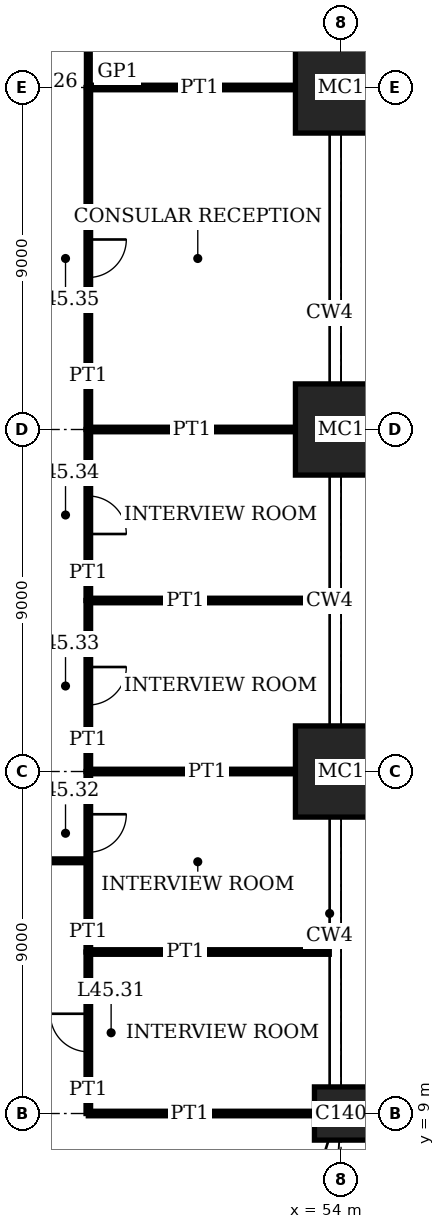
"""IFC4 building model, lengths in metres.
Left out: names, types, materials, properties, quantities, classifications, styles, units other than length and angle.
Written with IfcOpenShell. Run it as: python <this file> out.ifc"""

import sys

from ifc_helpers import new_model, si_unit, direction, frame, frame_2d, origin, origin_2d, place, context, subcontext, project, spatial, rectangle, extrude, element, fill, save


model = new_model("IFC4")
c1 = context("Model", 3, precision=1e-05, world=origin(), true_north=direction((0.0, 1.0)))
c2 = subcontext(c1, "Body", "Model", "MODEL_VIEW")
j1 = project(units=[si_unit("LENGTHUNIT", "METRE"), si_unit("PLANEANGLEUNIT", "RADIAN")], contexts=[c1])
p1 = place(None, origin())
s1 = spatial("IfcSite", under=j1, at=p1, CompositionType="ELEMENT")
p2 = place(p1, origin())
s2 = spatial("IfcBuilding", under=s1, at=p2, CompositionType="ELEMENT")
p3 = place(p2, frame((0.0, 0.0, 186.2)))
s3 = spatial("IfcBuildingStorey", under=s2, at=p3, CompositionType="ELEMENT", Elevation=186.2)
p4 = place(p3, frame((54.0, 9.0, 0.0), z_axis=(0.0, 0.0, 1.0), x_axis=(1.0, 0.0, 0.0)))
e1 = element("IfcColumn", 1, at=p4, inside=s3, PredefinedType="COLUMN", context=c2, shape_type="SweptSolid", body=[
    extrude(rectangle(XDim=1.4, YDim=1.4, at=origin_2d()), origin(), (0.0, 0.0, 1.0), 4.0),
])
for number, where, z_axis, x_axis in (
    (2, (54.0, 18.0, 0.0), (0.0, 0.0, 1.0), (1.0, 0.0, 0.0)),
    (3, (54.0, 27.0, 0.0), (0.0, 0.0, 1.0), (1.0, 0.0, 0.0)),
    (4, (54.0, 36.0, 0.0), (0.0, 0.0, 1.0), (1.0, 0.0, 0.0)),
):
    element("IfcColumn", number, at=place(p3, frame(where, z_axis=z_axis, x_axis=x_axis)), inside=s3, PredefinedType="COLUMN", context=c2, shape_type="SweptSolid", body=[
        extrude(rectangle(XDim=2.4, YDim=2.4, at=origin_2d()), origin(), (0.0, 0.0, 1.0), 4.0),
    ])
p5 = place(p3, frame((47.35, 9.0, 0.0), z_axis=(0.0, 0.0, 1.0), x_axis=(1.0, 0.0, 0.0)))
e5 = element("IfcWall", 5, at=p5, inside=s3, PredefinedType="PARTITIONING", context=c2, shape_type="SweptSolid", body=[
    extrude(rectangle(XDim=5.95, YDim=0.12, at=frame_2d((2.975, 0.0))), origin(), (0.0, 0.0, 1.0), 3.05),
])
p6 = place(p3, frame((47.35, 13.25, 0.0), z_axis=(0.0, 0.0, 1.0), x_axis=(1.0, 0.0, 0.0)))
e6 = element("IfcWall", 6, at=p6, inside=s3, PredefinedType="PARTITIONING", context=c2, shape_type="SweptSolid", body=[
    extrude(rectangle(XDim=6.34, YDim=0.12, at=frame_2d((3.17, 0.0))), origin(), (0.0, 0.0, 1.0), 3.1),
])
p7 = place(p3, frame((40.5, 15.65, 0.0), z_axis=(0.0, 0.0, 1.0), x_axis=(1.0, 0.0, 0.0)))
e7 = element("IfcWall", 7, at=p7, inside=s3, PredefinedType="PARTITIONING", context=c2, shape_type="SweptSolid", body=[
    extrude(rectangle(XDim=6.85, YDim=0.1, at=frame_2d((3.425, 0.0))), origin(), (0.0, 0.0, 1.0), 3.75),
])
p8 = place(p3, frame((47.35, 18.0, 0.0), z_axis=(0.0, 0.0, 1.0), x_axis=(1.0, 0.0, 0.0)))
e8 = element("IfcWall", 8, at=p8, inside=s3, PredefinedType="PARTITIONING", context=c2, shape_type="SweptSolid", body=[
    extrude(rectangle(XDim=5.45, YDim=0.12, at=frame_2d((2.725, 0.0))), origin(), (0.0, 0.0, 1.0), 3.05),
])
p9 = place(p3, frame((47.35, 22.5, 0.0), z_axis=(0.0, 0.0, 1.0), x_axis=(1.0, 0.0, 0.0)))
e9 = element("IfcWall", 9, at=p9, inside=s3, PredefinedType="PARTITIONING", context=c2, shape_type="SweptSolid", body=[
    extrude(rectangle(XDim=6.34, YDim=0.12, at=frame_2d((3.17, 0.0))), origin(), (0.0, 0.0, 1.0), 3.1),
])
for number, where, z_axis, x_axis in (
    (10, (47.35, 27.0, 0.0), (0.0, 0.0, 1.0), (1.0, 0.0, 0.0)),
    (11, (47.35, 36.0, 0.0), (0.0, 0.0, 1.0), (1.0, 0.0, 0.0)),
):
    element("IfcWall", number, at=place(p3, frame(where, z_axis=z_axis, x_axis=x_axis)), inside=s3, PredefinedType="PARTITIONING", context=c2, shape_type="SweptSolid", body=[
        extrude(rectangle(XDim=5.45, YDim=0.12, at=frame_2d((2.725, 0.0))), origin(), (0.0, 0.0, 1.0), 3.05),
    ])
p10 = place(p3, frame((47.35, 9.0, 0.0), z_axis=(0.0, 0.0, 1.0), x_axis=(0.0, 1.0, 0.0)))
e12 = element("IfcWall", 12, at=p10, inside=s3, PredefinedType="PARTITIONING", context=c2, shape_type="SweptSolid", body=[
    extrude(rectangle(XDim=4.25, YDim=0.12, at=frame_2d((2.125, 0.0))), origin(), (0.0, 0.0, 1.0), 3.75),
])
p11 = place(p10, frame((1.625, 0.0, 0.0)))
e13 = element("IfcOpeningElement", 13, at=p11, cuts=e12, PredefinedType="OPENING", context=c2, shape_type="SweptSolid", body=[
    extrude(rectangle(XDim=1.0, YDim=2.4, at=frame_2d((0.5, 1.2))), frame((0.0, 0.07, 0.0), z_axis=(0.0, -1.0, 0.0), x_axis=(1.0, 0.0, 0.0)), (0.0, 0.0, 1.0), 0.14),
])
p12 = place(p3, frame((47.35, 13.25, 0.0), z_axis=(0.0, 0.0, 1.0), x_axis=(0.0, 1.0, 0.0)))
e14 = element("IfcWall", 14, at=p12, inside=s3, PredefinedType="PARTITIONING", context=c2, shape_type="SweptSolid", body=[
    extrude(rectangle(XDim=4.75, YDim=0.12, at=frame_2d((2.375, 0.0))), origin(), (0.0, 0.0, 1.0), 3.75),
])
p13 = place(p12, frame((2.625, 0.0, 0.0)))
e15 = element("IfcOpeningElement", 15, at=p13, cuts=e14, PredefinedType="OPENING", context=c2, shape_type="SweptSolid", body=[
    extrude(rectangle(XDim=1.0, YDim=2.4, at=frame_2d((0.5, 1.2))), frame((0.0, 0.07, 0.0), z_axis=(0.0, -1.0, 0.0), x_axis=(1.0, 0.0, 0.0)), (0.0, 0.0, 1.0), 0.14),
])
p14 = place(p3, frame((47.35, 18.0, 0.0), z_axis=(0.0, 0.0, 1.0), x_axis=(0.0, 1.0, 0.0)))
e16 = element("IfcWall", 16, at=p14, inside=s3, PredefinedType="PARTITIONING", context=c2, shape_type="SweptSolid", body=[
    extrude(rectangle(XDim=4.5, YDim=0.12, at=frame_2d((2.25, 0.0))), origin(), (0.0, 0.0, 1.0), 3.75),
])
p15 = place(p14, frame((1.75, 0.0, 0.0)))
e17 = element("IfcOpeningElement", 17, at=p15, cuts=e16, PredefinedType="OPENING", context=c2, shape_type="SweptSolid", body=[
    extrude(rectangle(XDim=1.0, YDim=2.4, at=frame_2d((0.5, 1.2))), frame((0.0, 0.07, 0.0), z_axis=(0.0, -1.0, 0.0), x_axis=(1.0, 0.0, 0.0)), (0.0, 0.0, 1.0), 0.14),
])
p16 = place(p3, frame((47.35, 22.5, 0.0), z_axis=(0.0, 0.0, 1.0), x_axis=(0.0, 1.0, 0.0)))
e18 = element("IfcWall", 18, at=p16, inside=s3, PredefinedType="PARTITIONING", context=c2, shape_type="SweptSolid", body=[
    extrude(rectangle(XDim=4.5, YDim=0.12, at=frame_2d((2.25, 0.0))), origin(), (0.0, 0.0, 1.0), 3.75),
])
p17 = place(p16, frame((1.75, 0.0, 0.0)))
e19 = element("IfcOpeningElement", 19, at=p17, cuts=e18, PredefinedType="OPENING", context=c2, shape_type="SweptSolid", body=[
    extrude(rectangle(XDim=1.0, YDim=2.4, at=frame_2d((0.5, 1.2))), frame((0.0, 0.07, 0.0), z_axis=(0.0, -1.0, 0.0), x_axis=(1.0, 0.0, 0.0)), (0.0, 0.0, 1.0), 0.14),
])
p18 = place(p3, frame((47.35, 27.0, 0.0), z_axis=(0.0, 0.0, 1.0), x_axis=(0.0, 1.0, 0.0)))
e20 = element("IfcWall", 20, at=p18, inside=s3, PredefinedType="PARTITIONING", context=c2, shape_type="SweptSolid", body=[
    extrude(rectangle(XDim=9.0, YDim=0.12, at=frame_2d((4.5, 0.0))), origin(), (0.0, 0.0, 1.0), 3.75),
])
p19 = place(p18, frame((4.0, 0.0, 0.0)))
e21 = element("IfcOpeningElement", 21, at=p19, cuts=e20, PredefinedType="OPENING", context=c2, shape_type="SweptSolid", body=[
    extrude(rectangle(XDim=1.0, YDim=2.4, at=frame_2d((0.5, 1.2))), frame((0.0, 0.07, 0.0), z_axis=(0.0, -1.0, 0.0), x_axis=(1.0, 0.0, 0.0)), (0.0, 0.0, 1.0), 0.14),
])
p20 = place(p3, frame((47.35, 36.0, 0.0), z_axis=(0.0, 0.0, 1.0), x_axis=(0.0, 1.0, 0.0)))
e22 = element("IfcWall", 22, at=p20, inside=s3, PredefinedType="PARTITIONING", context=c2, shape_type="SweptSolid", body=[
    extrude(rectangle(XDim=2.35, YDim=0.1, at=frame_2d((1.175, 0.0))), origin(), (0.0, 0.0, 1.0), 3.75),
])
p21 = place(p11, origin())
e23 = element("IfcDoor", 23, at=p21, inside=s3, OperationType="SINGLE_SWING_LEFT", PredefinedType="DOOR", context=c2, shape_type="SweptSolid", body=[
    extrude(rectangle(XDim=1.0, YDim=2.4, at=frame_2d((0.5, 1.2))), frame((0.0, 0.025, 0.0), z_axis=(0.0, -1.0, 0.0), x_axis=(1.0, 0.0, 0.0)), (0.0, 0.0, 1.0), 0.05),
])
fill(e13, e23)
p22 = place(p13, origin())
e24 = element("IfcDoor", 24, at=p22, inside=s3, OperationType="SINGLE_SWING_RIGHT", PredefinedType="DOOR", context=c2, shape_type="SweptSolid", body=[
    extrude(rectangle(XDim=1.0, YDim=2.4, at=frame_2d((0.5, 1.2))), frame((0.0, 0.025, 0.0), z_axis=(0.0, -1.0, 0.0), x_axis=(1.0, 0.0, 0.0)), (0.0, 0.0, 1.0), 0.05),
])
fill(e15, e24)
p23 = place(p15, origin())
e25 = element("IfcDoor", 25, at=p23, inside=s3, OperationType="SINGLE_SWING_RIGHT", PredefinedType="DOOR", context=c2, shape_type="SweptSolid", body=[
    extrude(rectangle(XDim=1.0, YDim=2.4, at=frame_2d((0.5, 1.2))), frame((0.0, 0.025, 0.0), z_axis=(0.0, -1.0, 0.0), x_axis=(1.0, 0.0, 0.0)), (0.0, 0.0, 1.0), 0.05),
])
fill(e17, e25)
p24 = place(p17, origin())
e26 = element("IfcDoor", 26, at=p24, inside=s3, OperationType="SINGLE_SWING_LEFT", PredefinedType="DOOR", context=c2, shape_type="SweptSolid", body=[
    extrude(rectangle(XDim=1.0, YDim=2.4, at=frame_2d((0.5, 1.2))), frame((0.0, 0.025, 0.0), z_axis=(0.0, -1.0, 0.0), x_axis=(1.0, 0.0, 0.0)), (0.0, 0.0, 1.0), 0.05),
])
fill(e19, e26)
p25 = place(p19, origin())
e27 = element("IfcDoor", 27, at=p25, inside=s3, OperationType="SINGLE_SWING_RIGHT", PredefinedType="DOOR", context=c2, shape_type="SweptSolid", body=[
    extrude(rectangle(XDim=1.0, YDim=2.4, at=frame_2d((0.5, 1.2))), frame((0.0, 0.025, 0.0), z_axis=(0.0, -1.0, 0.0), x_axis=(1.0, 0.0, 0.0)), (0.0, 0.0, 1.0), 0.05),
])
fill(e21, e27)
save(model, sys.argv[1])
